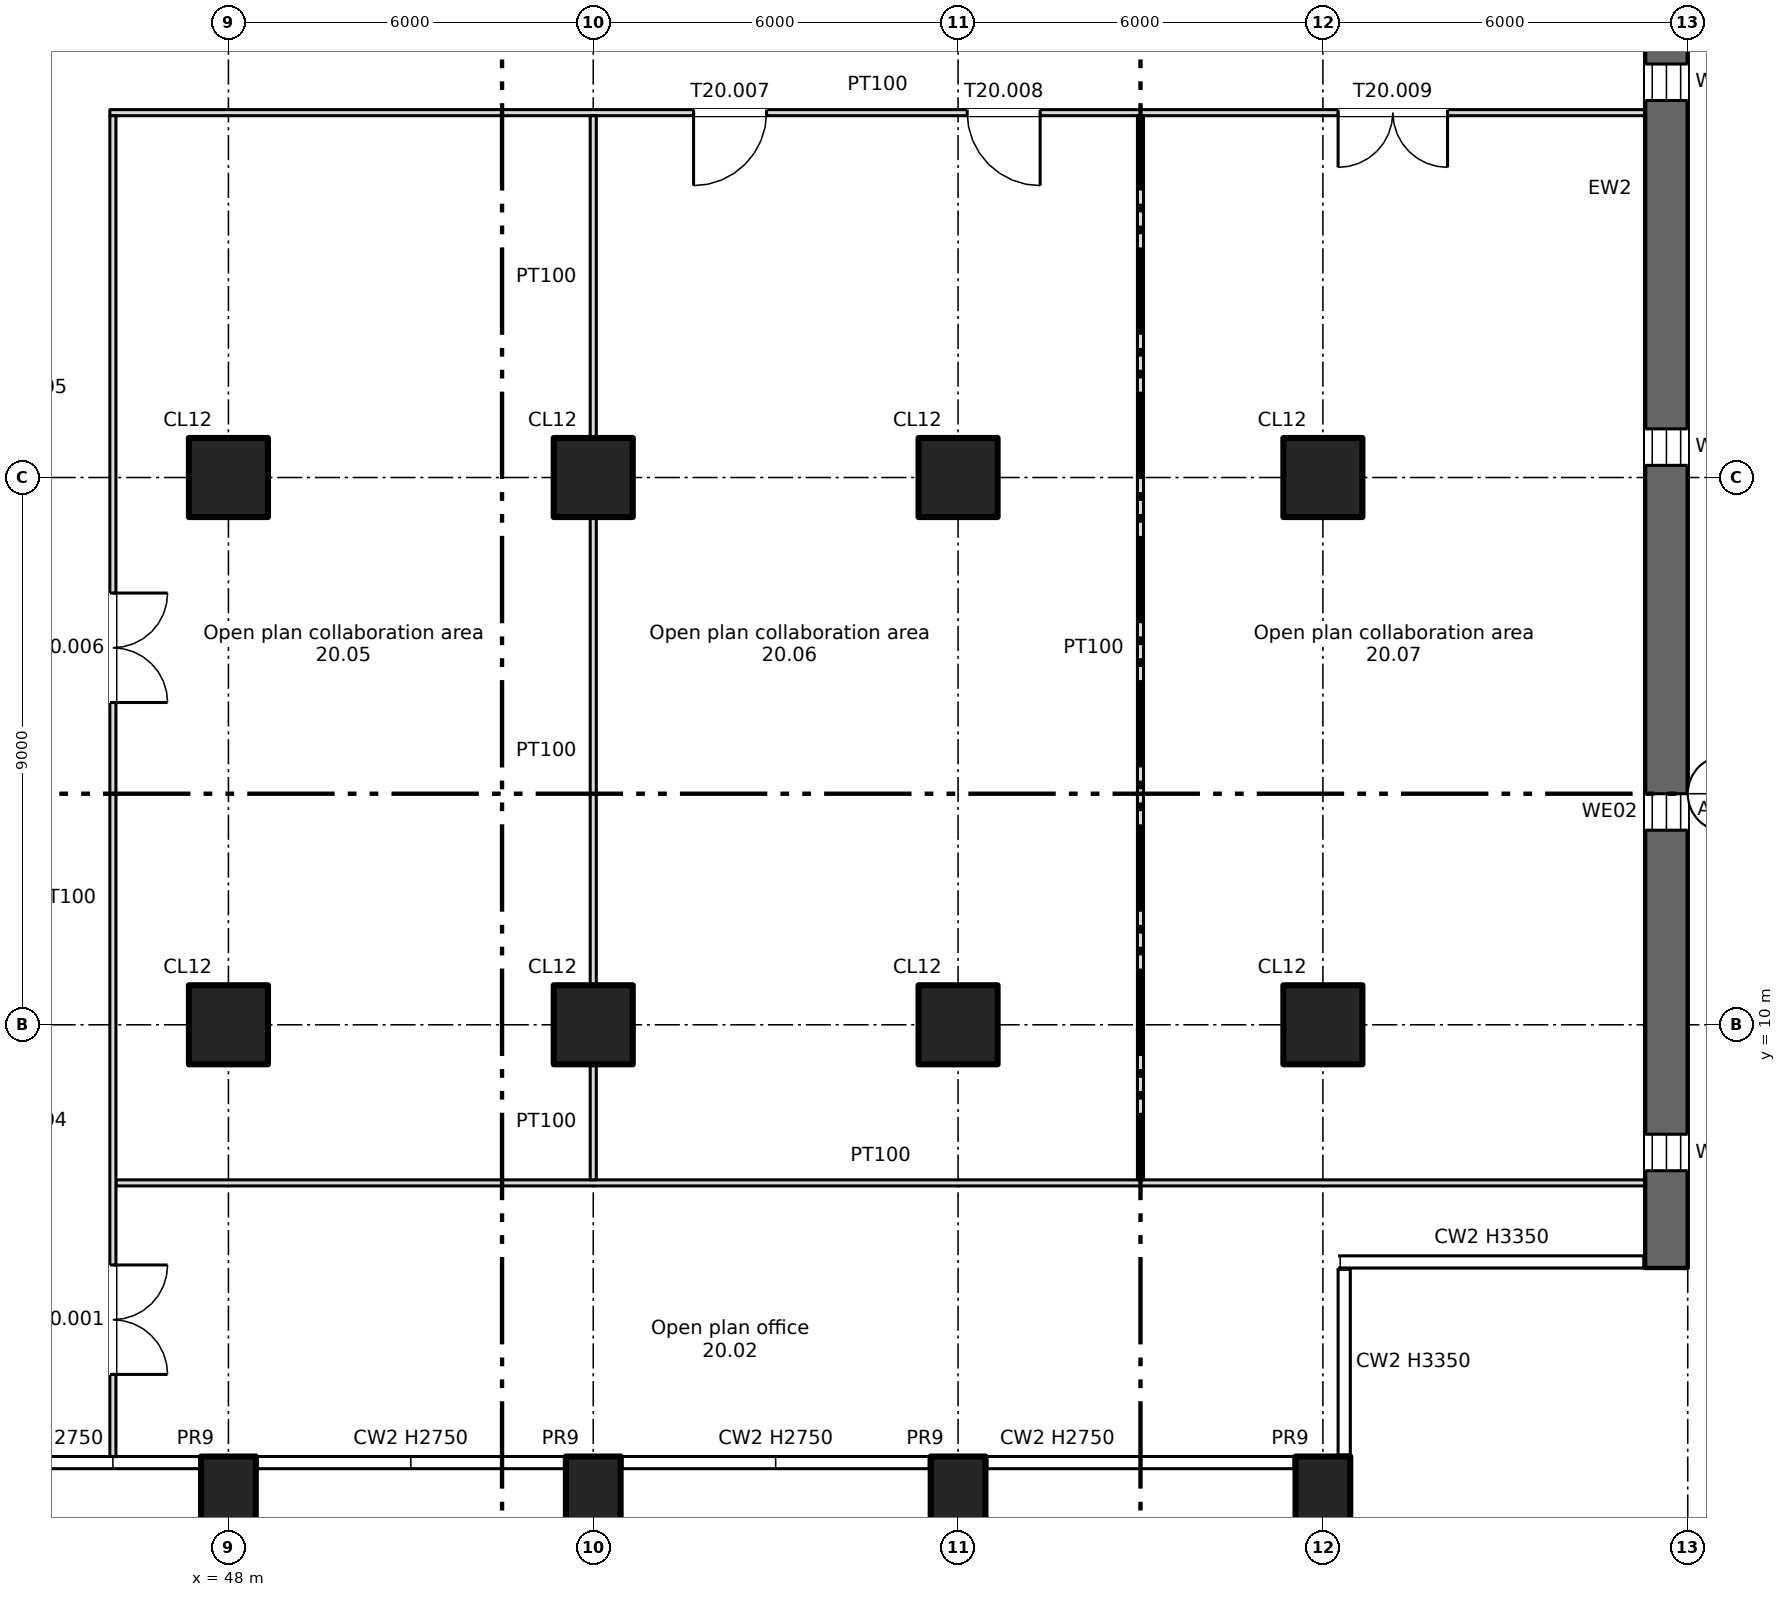
"""IFC4 building model, lengths in metres.
Left out: names, types, materials, properties, quantities, classifications, styles, units other than length and angle.
Written with IfcOpenShell. Run it as: python <this file> out.ifc"""

import sys

from ifc_helpers import new_model, si_unit, direction, frame, frame_2d, origin, origin_2d, place, context, subcontext, project, spatial, rectangle, extrude, element, fill, save


model = new_model("IFC4")
c1 = context("Model", 3, precision=1e-05, world=origin(), true_north=direction((0.0, 1.0)))
c2 = subcontext(c1, "Body", "Model", "MODEL_VIEW")
j1 = project(units=[si_unit("LENGTHUNIT", "METRE"), si_unit("PLANEANGLEUNIT", "RADIAN")], contexts=[c1])
p1 = place(None, origin())
s1 = spatial("IfcSite", under=j1, at=p1, CompositionType="ELEMENT")
p2 = place(p1, origin())
s2 = spatial("IfcBuilding", under=s1, at=p2, CompositionType="ELEMENT")
p3 = place(p2, frame((0.0, 0.0, 132.5)))
s3 = spatial("IfcBuildingStorey", under=s2, at=p3, CompositionType="ELEMENT", Elevation=132.5)
for number, where, z_axis, x_axis in (
    (1, (48.0, 2.2, -0.4), (0.0, 0.0, 1.0), (1.0, 0.0, 0.0)),
    (2, (54.0, 2.2, -0.4), (0.0, 0.0, 1.0), (1.0, 0.0, 0.0)),
    (3, (60.0, 2.2, -0.4), (0.0, 0.0, 1.0), (1.0, 0.0, 0.0)),
    (4, (66.0, 2.2, -0.4), (0.0, 0.0, 1.0), (1.0, 0.0, 0.0)),
):
    element("IfcColumn", number, at=place(p3, frame(where, z_axis=z_axis, x_axis=x_axis)), inside=s3, PredefinedType="COLUMN", context=c2, shape_type="SweptSolid", body=[
        extrude(rectangle(XDim=0.9, YDim=1.4, at=origin_2d()), origin(), (0.0, 0.0, 1.0), 3.75),
    ])
for number, where, z_axis, x_axis in (
    (5, (48.0, 10.0, 0.0), (0.0, 0.0, 1.0), (1.0, 0.0, 0.0)),
    (6, (48.0, 19.0, 0.0), (0.0, 0.0, 1.0), (1.0, 0.0, 0.0)),
    (7, (54.0, 10.0, 0.0), (0.0, 0.0, 1.0), (1.0, 0.0, 0.0)),
    (8, (54.0, 19.0, 0.0), (0.0, 0.0, 1.0), (1.0, 0.0, 0.0)),
    (9, (60.0, 10.0, 0.0), (0.0, 0.0, 1.0), (1.0, 0.0, 0.0)),
    (10, (60.0, 19.0, 0.0), (0.0, 0.0, 1.0), (1.0, 0.0, 0.0)),
    (11, (66.0, 10.0, 0.0), (0.0, 0.0, 1.0), (1.0, 0.0, 0.0)),
    (12, (66.0, 19.0, 0.0), (0.0, 0.0, 1.0), (1.0, 0.0, 0.0)),
):
    element("IfcColumn", number, at=place(p3, frame(where, z_axis=z_axis, x_axis=x_axis)), inside=s3, PredefinedType="COLUMN", context=c2, shape_type="SweptSolid", body=[
        extrude(rectangle(XDim=1.3, YDim=1.3, at=origin_2d()), origin(), (0.0, 0.0, 1.0), 3.35),
    ])
p4 = place(p3, frame((71.65, 6.0, 0.0), z_axis=(0.0, 0.0, 1.0), x_axis=(0.0, 1.0, 0.0)))
e13 = element("IfcWall", 13, at=p4, inside=s3, PredefinedType="SHEAR", context=c2, shape_type="SweptSolid", body=[
    extrude(rectangle(XDim=35.5, YDim=0.7, at=frame_2d((17.75, 0.0))), origin(), (0.0, 0.0, 1.0), 3.35),
])
p5 = place(p4, frame((1.6, 0.0, 0.6)))
e14 = element("IfcOpeningElement", 14, at=p5, cuts=e13, PredefinedType="OPENING", context=c2, shape_type="SweptSolid", body=[
    extrude(rectangle(XDim=0.6, YDim=2.4, at=frame_2d((0.3, 1.2))), frame((0.0, 0.36, 0.0), z_axis=(0.0, -1.0, 0.0), x_axis=(1.0, 0.0, 0.0)), (0.0, 0.0, 1.0), 0.72),
])
p6 = place(p4, frame((7.2, 0.0, 0.6)))
e15 = element("IfcOpeningElement", 15, at=p6, cuts=e13, PredefinedType="OPENING", context=c2, shape_type="SweptSolid", body=[
    extrude(rectangle(XDim=0.6, YDim=2.4, at=frame_2d((0.3, 1.2))), frame((0.0, 0.36, 0.0), z_axis=(0.0, -1.0, 0.0), x_axis=(1.0, 0.0, 0.0)), (0.0, 0.0, 1.0), 0.72),
])
p7 = place(p4, frame((13.2, 0.0, 0.6)))
e16 = element("IfcOpeningElement", 16, at=p7, cuts=e13, PredefinedType="OPENING", context=c2, shape_type="SweptSolid", body=[
    extrude(rectangle(XDim=0.6, YDim=2.4, at=frame_2d((0.3, 1.2))), frame((0.0, 0.36, 0.0), z_axis=(0.0, -1.0, 0.0), x_axis=(1.0, 0.0, 0.0)), (0.0, 0.0, 1.0), 0.72),
])
p8 = place(p4, frame((19.2, 0.0, 0.6)))
e17 = element("IfcOpeningElement", 17, at=p8, cuts=e13, PredefinedType="OPENING", context=c2, shape_type="SweptSolid", body=[
    extrude(rectangle(XDim=0.6, YDim=2.4, at=frame_2d((0.3, 1.2))), frame((0.0, 0.36, 0.0), z_axis=(0.0, -1.0, 0.0), x_axis=(1.0, 0.0, 0.0)), (0.0, 0.0, 1.0), 0.72),
])
p9 = place(p4, frame((25.2, 0.0, 0.6)))
e18 = element("IfcOpeningElement", 18, at=p9, cuts=e13, PredefinedType="OPENING", context=c2, shape_type="SweptSolid", body=[
    extrude(rectangle(XDim=0.6, YDim=2.4, at=frame_2d((0.3, 1.2))), frame((0.0, 0.36, 0.0), z_axis=(0.0, -1.0, 0.0), x_axis=(1.0, 0.0, 0.0)), (0.0, 0.0, 1.0), 0.72),
])
p10 = place(p4, frame((31.2, 0.0, 0.6)))
e19 = element("IfcOpeningElement", 19, at=p10, cuts=e13, PredefinedType="OPENING", context=c2, shape_type="SweptSolid", body=[
    extrude(rectangle(XDim=0.6, YDim=2.4, at=frame_2d((0.3, 1.2))), frame((0.0, 0.36, 0.0), z_axis=(0.0, -1.0, 0.0), x_axis=(1.0, 0.0, 0.0)), (0.0, 0.0, 1.0), 0.72),
])
p11 = place(p3, frame((46.15, 7.4, 0.0), z_axis=(0.0, 0.0, 1.0), x_axis=(1.0, 0.0, 0.0)))
e20 = element("IfcWall", 20, at=p11, inside=s3, PredefinedType="PARTITIONING", context=c2, shape_type="SweptSolid", body=[
    extrude(rectangle(XDim=25.15, YDim=0.1, at=frame_2d((12.575, 0.0))), origin(), (0.0, 0.0, 1.0), 3.35),
])
p12 = place(p3, frame((46.05, 25.0, 0.0), z_axis=(0.0, 0.0, 1.0), x_axis=(1.0, 0.0, 0.0)))
e21 = element("IfcWall", 21, at=p12, inside=s3, PredefinedType="PARTITIONING", context=c2, shape_type="SweptSolid", body=[
    extrude(rectangle(XDim=25.25, YDim=0.1, at=frame_2d((12.625, 0.0))), origin(), (0.0, 0.0, 1.0), 3.35),
])
p13 = place(p12, frame((9.6, 0.0, 0.0)))
e22 = element("IfcOpeningElement", 22, at=p13, cuts=e21, PredefinedType="OPENING", context=c2, shape_type="SweptSolid", body=[
    extrude(rectangle(XDim=1.2, YDim=2.1, at=frame_2d((0.6, 1.05))), frame((0.0, 0.06, 0.0), z_axis=(0.0, -1.0, 0.0), x_axis=(1.0, 0.0, 0.0)), (0.0, 0.0, 1.0), 0.12),
])
p14 = place(p12, frame((14.1, 0.0, 0.0)))
e23 = element("IfcOpeningElement", 23, at=p14, cuts=e21, PredefinedType="OPENING", context=c2, shape_type="SweptSolid", body=[
    extrude(rectangle(XDim=1.2, YDim=2.1, at=frame_2d((0.6, 1.05))), frame((0.0, 0.06, 0.0), z_axis=(0.0, -1.0, 0.0), x_axis=(1.0, 0.0, 0.0)), (0.0, 0.0, 1.0), 0.12),
])
p15 = place(p12, frame((20.2, 0.0, 0.0)))
e24 = element("IfcOpeningElement", 24, at=p15, cuts=e21, PredefinedType="OPENING", context=c2, shape_type="SweptSolid", body=[
    extrude(rectangle(XDim=1.8, YDim=2.1, at=frame_2d((0.9, 1.05))), frame((0.0, 0.06, 0.0), z_axis=(0.0, -1.0, 0.0), x_axis=(1.0, 0.0, 0.0)), (0.0, 0.0, 1.0), 0.12),
])
p16 = place(p3, frame((46.1, 2.9, 0.0), z_axis=(0.0, 0.0, 1.0), x_axis=(0.0, 1.0, 0.0)))
e25 = element("IfcWall", 25, at=p16, inside=s3, PredefinedType="PARTITIONING", context=c2, shape_type="SweptSolid", body=[
    extrude(rectangle(XDim=22.05, YDim=0.1, at=frame_2d((11.025, 0.0))), origin(), (0.0, 0.0, 1.0), 3.35),
])
p17 = place(p16, frame((1.35, 0.0, 0.0)))
e26 = element("IfcOpeningElement", 26, at=p17, cuts=e25, PredefinedType="OPENING", context=c2, shape_type="SweptSolid", body=[
    extrude(rectangle(XDim=1.8, YDim=2.1, at=frame_2d((0.9, 1.05))), frame((0.0, 0.06, 0.0), z_axis=(0.0, -1.0, 0.0), x_axis=(1.0, 0.0, 0.0)), (0.0, 0.0, 1.0), 0.12),
])
p18 = place(p16, frame((12.4, 0.0, 0.0)))
e27 = element("IfcOpeningElement", 27, at=p18, cuts=e25, PredefinedType="OPENING", context=c2, shape_type="SweptSolid", body=[
    extrude(rectangle(XDim=1.8, YDim=2.1, at=frame_2d((0.9, 1.05))), frame((0.0, 0.06, 0.0), z_axis=(0.0, -1.0, 0.0), x_axis=(1.0, 0.0, 0.0)), (0.0, 0.0, 1.0), 0.12),
])
p19 = place(p3, frame((54.0, 7.45, 0.0), z_axis=(0.0, 0.0, 1.0), x_axis=(0.0, 1.0, 0.0)))
e28 = element("IfcWall", 28, at=p19, inside=s3, PredefinedType="PARTITIONING", context=c2, shape_type="SweptSolid", body=[
    extrude(rectangle(XDim=1.9, YDim=0.1, at=frame_2d((0.95, 0.0))), origin(), (0.0, 0.0, 1.0), 3.35),
])
p20 = place(p3, frame((54.0, 10.65, 0.0), z_axis=(0.0, 0.0, 1.0), x_axis=(0.0, 1.0, 0.0)))
e29 = element("IfcWall", 29, at=p20, inside=s3, PredefinedType="PARTITIONING", context=c2, shape_type="SweptSolid", body=[
    extrude(rectangle(XDim=7.7, YDim=0.1, at=frame_2d((3.85, 0.0))), origin(), (0.0, 0.0, 1.0), 3.35),
])
p21 = place(p3, frame((54.0, 19.65, 0.0), z_axis=(0.0, 0.0, 1.0), x_axis=(0.0, 1.0, 0.0)))
e30 = element("IfcWall", 30, at=p21, inside=s3, PredefinedType="PARTITIONING", context=c2, shape_type="SweptSolid", body=[
    extrude(rectangle(XDim=5.3, YDim=0.1, at=frame_2d((2.65, 0.0))), origin(), (0.0, 0.0, 1.0), 3.35),
])
p22 = place(p3, frame((63.0, 7.45, 0.0), z_axis=(0.0, 0.0, 1.0), x_axis=(0.0, 1.0, 0.0)))
e31 = element("IfcWall", 31, at=p22, inside=s3, PredefinedType="PARTITIONING", context=c2, shape_type="SweptSolid", body=[
    extrude(rectangle(XDim=17.5, YDim=0.1, at=frame_2d((8.75, 0.0))), origin(), (0.0, 0.0, 1.0), 3.35),
])
p23 = place(p5, origin())
e32 = element("IfcWindow", 32, at=p23, inside=s3, PartitioningType="SINGLE_PANEL", PredefinedType="WINDOW", context=c2, shape_type="SweptSolid", body=[
    extrude(rectangle(XDim=0.6, YDim=2.4, at=frame_2d((0.3, 1.2))), frame((0.0, 0.03, 0.0), z_axis=(0.0, -1.0, 0.0), x_axis=(1.0, 0.0, 0.0)), (0.0, 0.0, 1.0), 0.06),
])
fill(e14, e32)
p24 = place(p6, origin())
e33 = element("IfcWindow", 33, at=p24, inside=s3, PartitioningType="SINGLE_PANEL", PredefinedType="WINDOW", context=c2, shape_type="SweptSolid", body=[
    extrude(rectangle(XDim=0.6, YDim=2.4, at=frame_2d((0.3, 1.2))), frame((0.0, 0.03, 0.0), z_axis=(0.0, -1.0, 0.0), x_axis=(1.0, 0.0, 0.0)), (0.0, 0.0, 1.0), 0.06),
])
fill(e15, e33)
p25 = place(p7, origin())
e34 = element("IfcWindow", 34, at=p25, inside=s3, PartitioningType="SINGLE_PANEL", PredefinedType="WINDOW", context=c2, shape_type="SweptSolid", body=[
    extrude(rectangle(XDim=0.6, YDim=2.4, at=frame_2d((0.3, 1.2))), frame((0.0, 0.03, 0.0), z_axis=(0.0, -1.0, 0.0), x_axis=(1.0, 0.0, 0.0)), (0.0, 0.0, 1.0), 0.06),
])
fill(e16, e34)
p26 = place(p8, origin())
e35 = element("IfcWindow", 35, at=p26, inside=s3, PartitioningType="SINGLE_PANEL", PredefinedType="WINDOW", context=c2, shape_type="SweptSolid", body=[
    extrude(rectangle(XDim=0.6, YDim=2.4, at=frame_2d((0.3, 1.2))), frame((0.0, 0.03, 0.0), z_axis=(0.0, -1.0, 0.0), x_axis=(1.0, 0.0, 0.0)), (0.0, 0.0, 1.0), 0.06),
])
fill(e17, e35)
p27 = place(p17, origin())
e36 = element("IfcDoor", 36, at=p27, inside=s3, OperationType="DOUBLE_DOOR_SINGLE_SWING", PredefinedType="DOOR", context=c2, shape_type="SweptSolid", body=[
    extrude(rectangle(XDim=1.8, YDim=2.1, at=frame_2d((0.9, 1.05))), frame((0.0, 0.025, 0.0), z_axis=(0.0, -1.0, 0.0), x_axis=(1.0, 0.0, 0.0)), (0.0, 0.0, 1.0), 0.05),
])
fill(e26, e36)
p28 = place(p18, origin())
e37 = element("IfcDoor", 37, at=p28, inside=s3, OperationType="DOUBLE_DOOR_SINGLE_SWING", PredefinedType="DOOR", context=c2, shape_type="SweptSolid", body=[
    extrude(rectangle(XDim=1.8, YDim=2.1, at=frame_2d((0.9, 1.05))), frame((0.0, 0.025, 0.0), z_axis=(0.0, -1.0, 0.0), x_axis=(1.0, 0.0, 0.0)), (0.0, 0.0, 1.0), 0.05),
])
fill(e27, e37)
p29 = place(p13, origin())
e38 = element("IfcDoor", 38, at=p29, inside=s3, OperationType="SINGLE_SWING_LEFT", PredefinedType="DOOR", context=c2, shape_type="SweptSolid", body=[
    extrude(rectangle(XDim=1.2, YDim=2.1, at=frame_2d((0.6, 1.05))), frame((0.0, 0.025, 0.0), z_axis=(0.0, -1.0, 0.0), x_axis=(1.0, 0.0, 0.0)), (0.0, 0.0, 1.0), 0.05),
])
fill(e22, e38)
p30 = place(p14, origin())
e39 = element("IfcDoor", 39, at=p30, inside=s3, OperationType="SINGLE_SWING_RIGHT", PredefinedType="DOOR", context=c2, shape_type="SweptSolid", body=[
    extrude(rectangle(XDim=1.2, YDim=2.1, at=frame_2d((0.6, 1.05))), frame((0.0, 0.025, 0.0), z_axis=(0.0, -1.0, 0.0), x_axis=(1.0, 0.0, 0.0)), (0.0, 0.0, 1.0), 0.05),
])
fill(e23, e39)
p31 = place(p15, origin())
e40 = element("IfcDoor", 40, at=p31, inside=s3, OperationType="DOUBLE_DOOR_SINGLE_SWING", PredefinedType="DOOR", context=c2, shape_type="SweptSolid", body=[
    extrude(rectangle(XDim=1.8, YDim=2.1, at=frame_2d((0.9, 1.05))), frame((0.0, 0.025, 0.0), z_axis=(0.0, -1.0, 0.0), x_axis=(1.0, 0.0, 0.0)), (0.0, 0.0, 1.0), 0.05),
])
fill(e24, e40)
save(model, sys.argv[1])
